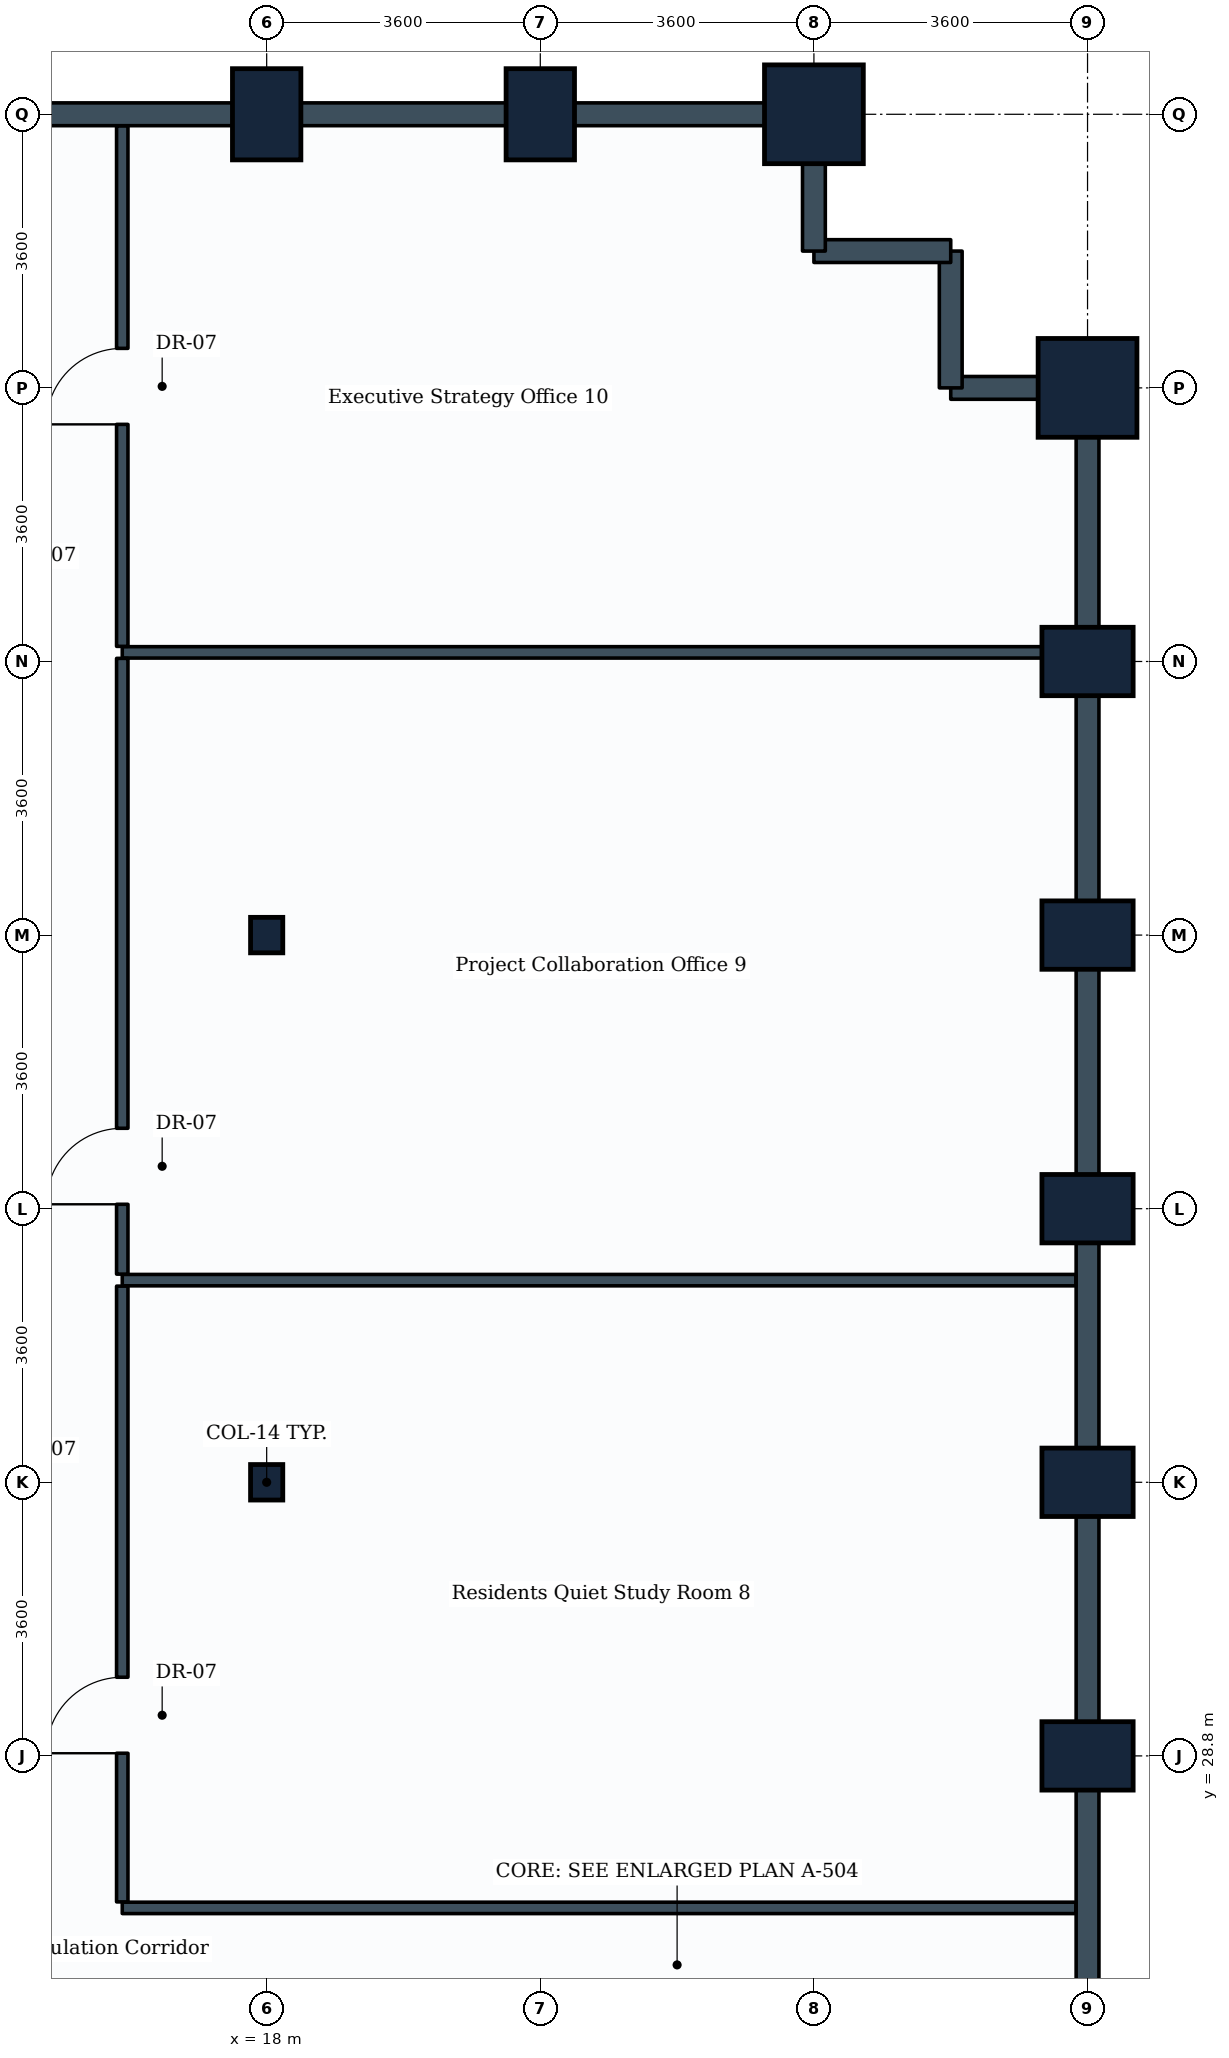
"""IFC4 building model, lengths in metres.
Left out: names, types, materials, properties, quantities, classifications, styles, units other than length and angle.
Written with IfcOpenShell. Run it as: python <this file> out.ifc"""

import sys

from ifc_helpers import new_model, si_unit, direction, frame, frame_2d, origin, origin_2d, place, context, subcontext, project, spatial, rectangle, i_section, extrude, element, fill, save


model = new_model("IFC4")
c1 = context("Model", 3, precision=1e-05, world=origin(), true_north=direction((0.0, 1.0)))
c2 = subcontext(c1, "Body", "Model", "MODEL_VIEW")
j1 = project(units=[si_unit("LENGTHUNIT", "METRE"), si_unit("PLANEANGLEUNIT", "RADIAN")], contexts=[c1])
p1 = place(None, origin())
s1 = spatial("IfcSite", under=j1, at=p1, CompositionType="ELEMENT")
p2 = place(p1, origin())
s2 = spatial("IfcBuilding", under=s1, at=p2, CompositionType="ELEMENT")
p3 = place(p2, frame((0.0, 0.0, 66.9)))
s3 = spatial("IfcBuildingStorey", under=s2, at=p3, CompositionType="ELEMENT", Elevation=66.9)
for number, where, z_axis, x_axis in (
    (1, (18.0, 32.4, 0.0), (0.0, 0.0, 1.0), (1.0, 0.0, 0.0)),
    (2, (18.0, 39.6, 0.0), (0.0, 0.0, 1.0), (1.0, 0.0, 0.0)),
):
    element("IfcColumn", number, at=place(p3, frame(where, z_axis=z_axis, x_axis=x_axis)), inside=s3, PredefinedType="COLUMN", context=c2, shape_type="SweptSolid", body=[
        extrude(i_section(OverallWidth=0.424, OverallDepth=0.467, WebThickness=0.033, FlangeThickness=0.053, FilletRadius=0.015, at=origin_2d()), origin(), (0.0, 0.0, 1.0), 3.9),
    ])
for number, where, z_axis, x_axis in (
    (3, (18.0, 50.4, 0.0), (0.0, 0.0, 1.0), (1.0, 0.0, 0.0)),
    (4, (21.6, 50.4, 0.0), (0.0, 0.0, 1.0), (1.0, 0.0, 0.0)),
):
    element("IfcColumn", number, at=place(p3, frame(where, z_axis=z_axis, x_axis=x_axis)), inside=s3, PredefinedType="COLUMN", context=c2, shape_type="SweptSolid", body=[
        extrude(rectangle(XDim=0.9, YDim=1.2, at=origin_2d()), origin(), (0.0, 0.0, 1.0), 3.9),
    ])
p4 = place(p3, frame((25.2, 50.4, 0.0), z_axis=(0.0, 0.0, 1.0), x_axis=(1.0, 0.0, 0.0)))
e5 = element("IfcColumn", 5, at=p4, inside=s3, PredefinedType="COLUMN", context=c2, shape_type="SweptSolid", body=[
    extrude(rectangle(XDim=1.3, YDim=1.3, at=origin_2d()), origin(), (0.0, 0.0, 1.0), 3.9),
])
for number, where, z_axis, x_axis in (
    (6, (28.8, 28.8, 0.0), (0.0, 0.0, 1.0), (0.0, 1.0, 0.0)),
    (7, (28.8, 32.4, 0.0), (0.0, 0.0, 1.0), (0.0, 1.0, 0.0)),
    (8, (28.8, 36.0, 0.0), (0.0, 0.0, 1.0), (0.0, 1.0, 0.0)),
    (9, (28.8, 39.6, 0.0), (0.0, 0.0, 1.0), (0.0, 1.0, 0.0)),
    (10, (28.8, 43.2, 0.0), (0.0, 0.0, 1.0), (0.0, 1.0, 0.0)),
):
    element("IfcColumn", number, at=place(p3, frame(where, z_axis=z_axis, x_axis=x_axis)), inside=s3, PredefinedType="COLUMN", context=c2, shape_type="SweptSolid", body=[
        extrude(rectangle(XDim=0.9, YDim=1.2, at=origin_2d()), origin(), (0.0, 0.0, 1.0), 3.9),
    ])
p5 = place(p3, frame((28.8, 46.8, 0.0), z_axis=(0.0, 0.0, 1.0), x_axis=(0.0, 1.0, 0.0)))
e11 = element("IfcColumn", 11, at=p5, inside=s3, PredefinedType="COLUMN", context=c2, shape_type="SweptSolid", body=[
    extrude(rectangle(XDim=1.3, YDim=1.3, at=origin_2d()), origin(), (0.0, 0.0, 1.0), 3.9),
])
p6 = place(p3, frame((28.8, 25.2, 0.0), z_axis=(0.0, 0.0, 1.0), x_axis=(0.0, 1.0, 0.0)))
e12 = element("IfcWall", 12, at=p6, inside=s3, PredefinedType="STANDARD", context=c2, shape_type="SweptSolid", body=[
    extrude(rectangle(XDim=3.6, YDim=0.3, at=frame_2d((1.8, 0.0))), origin(), (0.0, 0.0, 1.0), 3.14),
])
p7 = place(p3, frame((28.8, 28.8, 0.0), z_axis=(0.0, 0.0, 1.0), x_axis=(0.0, 1.0, 0.0)))
e13 = element("IfcWall", 13, at=p7, inside=s3, PredefinedType="STANDARD", context=c2, shape_type="SweptSolid", body=[
    extrude(rectangle(XDim=3.6, YDim=0.3, at=frame_2d((1.8, 0.0))), origin(), (0.0, 0.0, 1.0), 2.93),
])
for number, where, z_axis, x_axis in (
    (14, (28.8, 32.4, 0.0), (0.0, 0.0, 1.0), (0.0, 1.0, 0.0)),
    (15, (28.8, 36.0, 0.0), (0.0, 0.0, 1.0), (0.0, 1.0, 0.0)),
):
    element("IfcWall", number, at=place(p3, frame(where, z_axis=z_axis, x_axis=x_axis)), inside=s3, PredefinedType="STANDARD", context=c2, shape_type="SweptSolid", body=[
        extrude(rectangle(XDim=3.6, YDim=0.3, at=frame_2d((1.8, 0.0))), origin(), (0.0, 0.0, 1.0), 2.93),
    ])
p8 = place(p3, frame((28.8, 39.6, 0.0), z_axis=(0.0, 0.0, 1.0), x_axis=(0.0, 1.0, 0.0)))
e16 = element("IfcWall", 16, at=p8, inside=s3, PredefinedType="STANDARD", context=c2, shape_type="SweptSolid", body=[
    extrude(rectangle(XDim=3.6, YDim=0.3, at=frame_2d((1.8, 0.0))), origin(), (0.0, 0.0, 1.0), 2.93),
])
p9 = place(p3, frame((28.8, 43.2, 0.0), z_axis=(0.0, 0.0, 1.0), x_axis=(0.0, 1.0, 0.0)))
e17 = element("IfcWall", 17, at=p9, inside=s3, PredefinedType="STANDARD", context=c2, shape_type="SweptSolid", body=[
    extrude(rectangle(XDim=3.6, YDim=0.3, at=frame_2d((1.8, 0.0))), origin(), (0.0, 0.0, 1.0), 2.93),
])
p10 = place(p3, frame((27.0, 46.8, 0.0), z_axis=(0.0, 0.0, 1.0), x_axis=(1.0, 0.0, 0.0)))
e18 = element("IfcWall", 18, at=p10, inside=s3, PredefinedType="STANDARD", context=c2, shape_type="SweptSolid", body=[
    extrude(rectangle(XDim=1.8, YDim=0.3, at=frame_2d((0.9, 0.0))), origin(), (0.0, 0.0, 1.0), 2.93),
])
for number, where, z_axis, x_axis in (
    (19, (27.0, 46.8, 0.0), (0.0, 0.0, 1.0), (0.0, 1.0, 0.0)),
    (20, (25.2, 48.6, 0.0), (0.0, 0.0, 1.0), (1.0, 0.0, 0.0)),
):
    element("IfcWall", number, at=place(p3, frame(where, z_axis=z_axis, x_axis=x_axis)), inside=s3, PredefinedType="STANDARD", context=c2, shape_type="SweptSolid", body=[
        extrude(rectangle(XDim=1.8, YDim=0.3, at=frame_2d((0.9, 0.0))), origin(), (0.0, 0.0, 1.0), 3.635),
    ])
p11 = place(p3, frame((25.2, 48.6, 0.0), z_axis=(0.0, 0.0, 1.0), x_axis=(0.0, 1.0, 0.0)))
e21 = element("IfcWall", 21, at=p11, inside=s3, PredefinedType="STANDARD", context=c2, shape_type="SweptSolid", body=[
    extrude(rectangle(XDim=1.8, YDim=0.3, at=frame_2d((0.9, 0.0))), origin(), (0.0, 0.0, 1.0), 2.93),
])
p12 = place(p3, frame((21.6, 50.4, 0.0), z_axis=(0.0, 0.0, 1.0), x_axis=(1.0, 0.0, 0.0)))
e22 = element("IfcWall", 22, at=p12, inside=s3, PredefinedType="STANDARD", context=c2, shape_type="SweptSolid", body=[
    extrude(rectangle(XDim=3.6, YDim=0.3, at=frame_2d((1.8, 0.0))), origin(), (0.0, 0.0, 1.0), 2.93),
])
for number, where, z_axis, x_axis in (
    (23, (18.0, 50.4, 0.0), (0.0, 0.0, 1.0), (1.0, 0.0, 0.0)),
    (24, (14.4, 50.4, 0.0), (0.0, 0.0, 1.0), (1.0, 0.0, 0.0)),
):
    element("IfcWall", number, at=place(p3, frame(where, z_axis=z_axis, x_axis=x_axis)), inside=s3, PredefinedType="STANDARD", context=c2, shape_type="SweptSolid", body=[
        extrude(rectangle(XDim=3.6, YDim=0.3, at=frame_2d((1.8, 0.0))), origin(), (0.0, 0.0, 1.0), 2.93),
    ])
p13 = place(p3, frame((16.1, 26.8, 0.0), z_axis=(0.0, 0.0, 1.0), x_axis=(1.0, 0.0, 0.0)))
e25 = element("IfcWall", 25, at=p13, inside=s3, PredefinedType="PARTITIONING", context=c2, shape_type="SweptSolid", body=[
    extrude(rectangle(XDim=12.546, YDim=0.15, at=frame_2d((6.273, 0.0))), origin(), (0.0, 0.0, 1.0), 3.08),
])
p14 = place(p3, frame((16.1, 35.06, 0.0), z_axis=(0.0, 0.0, 1.0), x_axis=(1.0, 0.0, 0.0)))
e26 = element("IfcWall", 26, at=p14, inside=s3, PredefinedType="PARTITIONING", context=c2, shape_type="SweptSolid", body=[
    extrude(rectangle(XDim=12.546, YDim=0.15, at=frame_2d((6.273, 0.0))), origin(), (0.0, 0.0, 1.0), 2.93),
])
p15 = place(p3, frame((16.1, 26.879, 0.0), z_axis=(0.0, 0.0, 1.0), x_axis=(0.0, 1.0, 0.0)))
e27 = element("IfcWall", 27, at=p15, inside=s3, PredefinedType="PARTITIONING", context=c2, shape_type="SweptSolid", body=[
    extrude(rectangle(XDim=8.102, YDim=0.15, at=frame_2d((4.051, 0.0))), origin(), (0.0, 0.0, 1.0), 3.08),
])
p16 = place(p15, frame((1.956, 0.0, 0.0)))
e28 = element("IfcOpeningElement", 28, at=p16, cuts=e27, PredefinedType="OPENING", context=c2, shape_type="SweptSolid", body=[
    extrude(rectangle(XDim=1.0, YDim=2.1, at=frame_2d((0.5, 1.05))), frame((0.0, 0.085, 0.0), z_axis=(0.0, -1.0, 0.0), x_axis=(1.0, 0.0, 0.0)), (0.0, 0.0, 1.0), 0.17),
])
p17 = place(p3, frame((16.1, 43.32, 0.0), z_axis=(0.0, 0.0, 1.0), x_axis=(1.0, 0.0, 0.0)))
e29 = element("IfcWall", 29, at=p17, inside=s3, PredefinedType="PARTITIONING", context=c2, shape_type="SweptSolid", body=[
    extrude(rectangle(XDim=12.546, YDim=0.15, at=frame_2d((6.273, 0.0))), origin(), (0.0, 0.0, 1.0), 2.93),
])
p18 = place(p3, frame((16.1, 35.139, 0.0), z_axis=(0.0, 0.0, 1.0), x_axis=(0.0, 1.0, 0.0)))
e30 = element("IfcWall", 30, at=p18, inside=s3, PredefinedType="PARTITIONING", context=c2, shape_type="SweptSolid", body=[
    extrude(rectangle(XDim=8.102, YDim=0.15, at=frame_2d((4.051, 0.0))), origin(), (0.0, 0.0, 1.0), 3.08),
])
p19 = place(p18, frame((0.919, 0.0, 0.0)))
e31 = element("IfcOpeningElement", 31, at=p19, cuts=e30, PredefinedType="OPENING", context=c2, shape_type="SweptSolid", body=[
    extrude(rectangle(XDim=1.0, YDim=2.1, at=frame_2d((0.5, 1.05))), frame((0.0, 0.085, 0.0), z_axis=(0.0, -1.0, 0.0), x_axis=(1.0, 0.0, 0.0)), (0.0, 0.0, 1.0), 0.17),
])
p20 = place(p3, frame((16.1, 43.399, 0.0), z_axis=(0.0, 0.0, 1.0), x_axis=(0.0, 1.0, 0.0)))
e32 = element("IfcWall", 32, at=p20, inside=s3, PredefinedType="PARTITIONING", context=c2, shape_type="SweptSolid", body=[
    extrude(rectangle(XDim=6.847, YDim=0.15, at=frame_2d((3.424, 0.0))), origin(), (0.0, 0.0, 1.0), 2.93),
])
p21 = place(p20, frame((2.921, 0.0, 0.0)))
e33 = element("IfcOpeningElement", 33, at=p21, cuts=e32, PredefinedType="OPENING", context=c2, shape_type="SweptSolid", body=[
    extrude(rectangle(XDim=1.0, YDim=2.1, at=frame_2d((0.5, 1.05))), frame((0.0, 0.085, 0.0), z_axis=(0.0, -1.0, 0.0), x_axis=(1.0, 0.0, 0.0)), (0.0, 0.0, 1.0), 0.17),
])
p22 = place(p16, origin())
e34 = element("IfcDoor", 34, at=p22, inside=s3, OperationType="SINGLE_SWING_LEFT", PredefinedType="DOOR", context=c2, shape_type="SweptSolid", body=[
    extrude(rectangle(XDim=1.0, YDim=2.1, at=frame_2d((0.5, 1.05))), frame((0.0, 0.025, 0.0), z_axis=(0.0, -1.0, 0.0), x_axis=(1.0, 0.0, 0.0)), (0.0, 0.0, 1.0), 0.05),
])
fill(e28, e34)
p23 = place(p19, origin())
e35 = element("IfcDoor", 35, at=p23, inside=s3, OperationType="SINGLE_SWING_LEFT", PredefinedType="DOOR", context=c2, shape_type="SweptSolid", body=[
    extrude(rectangle(XDim=1.0, YDim=2.1, at=frame_2d((0.5, 1.05))), frame((0.0, 0.025, 0.0), z_axis=(0.0, -1.0, 0.0), x_axis=(1.0, 0.0, 0.0)), (0.0, 0.0, 1.0), 0.05),
])
fill(e31, e35)
p24 = place(p21, origin())
e36 = element("IfcDoor", 36, at=p24, inside=s3, OperationType="SINGLE_SWING_LEFT", PredefinedType="DOOR", context=c2, shape_type="SweptSolid", body=[
    extrude(rectangle(XDim=1.0, YDim=2.1, at=frame_2d((0.5, 1.05))), frame((0.0, 0.025, 0.0), z_axis=(0.0, -1.0, 0.0), x_axis=(1.0, 0.0, 0.0)), (0.0, 0.0, 1.0), 0.05),
])
fill(e33, e36)
save(model, sys.argv[1])
